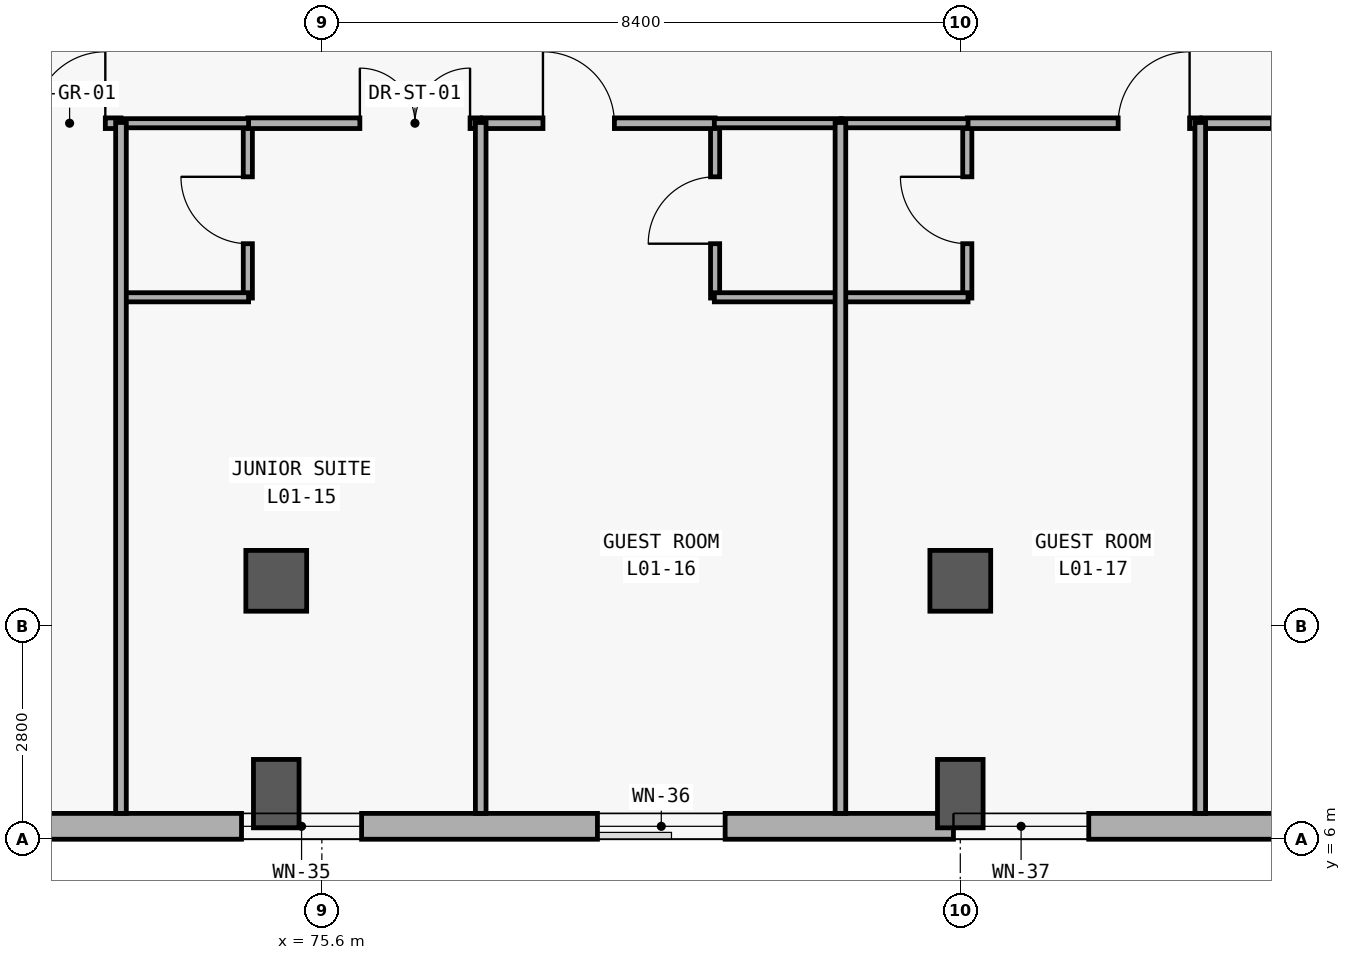
"""IFC4 building model, lengths in metres.
Left out: names, types, materials, properties, quantities, classifications, styles, units other than length and angle.
Written with IfcOpenShell. Run it as: python <this file> out.ifc"""

import sys

from ifc_helpers import new_model, si_unit, direction, frame, frame_2d, origin, origin_2d, place, context, subcontext, project, spatial, rectangle, extrude, element, fill, save


model = new_model("IFC4")
c1 = context("Model", 3, precision=1e-05, world=origin(), true_north=direction((0.0, 1.0)))
c2 = subcontext(c1, "Body", "Model", "MODEL_VIEW")
j1 = project(units=[si_unit("LENGTHUNIT", "METRE"), si_unit("PLANEANGLEUNIT", "RADIAN")], contexts=[c1])
p1 = place(None, origin())
s1 = spatial("IfcSite", under=j1, at=p1, CompositionType="ELEMENT")
p2 = place(p1, origin())
s2 = spatial("IfcBuilding", under=s1, at=p2, CompositionType="ELEMENT")
p3 = place(p2, frame((0.0, 0.0, 5.4)))
s3 = spatial("IfcBuildingStorey", under=s2, at=p3, CompositionType="ELEMENT", Elevation=5.4)
p4 = place(p3, frame((75.0, 6.6, 0.0), z_axis=(0.0, 0.0, 1.0), x_axis=(0.0, 1.0, 0.0)))
e1 = element("IfcColumn", 1, at=p4, inside=s3, PredefinedType="COLUMN", context=c2, shape_type="SweptSolid", body=[
    extrude(rectangle(XDim=0.6, YDim=0.9, at=origin_2d()), origin(), (0.0, 0.0, 1.0), 5.4),
])
p5 = place(p3, frame((75.0, 9.4, 0.0), z_axis=(0.0, 0.0, 1.0), x_axis=(1.0, 0.0, 0.0)))
e2 = element("IfcColumn", 2, at=p5, inside=s3, PredefinedType="COLUMN", context=c2, shape_type="SweptSolid", body=[
    extrude(rectangle(XDim=0.8, YDim=0.8, at=origin_2d()), origin(), (0.0, 0.0, 1.0), 5.4),
])
p6 = place(p3, frame((84.0, 6.6, 0.0), z_axis=(0.0, 0.0, 1.0), x_axis=(0.0, 1.0, 0.0)))
e3 = element("IfcColumn", 3, at=p6, inside=s3, PredefinedType="COLUMN", context=c2, shape_type="SweptSolid", body=[
    extrude(rectangle(XDim=0.6, YDim=0.9, at=origin_2d()), origin(), (0.0, 0.0, 1.0), 5.4),
])
p7 = place(p3, frame((84.0, 9.4, 0.0), z_axis=(0.0, 0.0, 1.0), x_axis=(1.0, 0.0, 0.0)))
e4 = element("IfcColumn", 4, at=p7, inside=s3, PredefinedType="COLUMN", context=c2, shape_type="SweptSolid", body=[
    extrude(rectangle(XDim=0.8, YDim=0.8, at=origin_2d()), origin(), (0.0, 0.0, 1.0), 5.4),
])
p8 = place(p3, frame((92.06, 6.17, 0.0), z_axis=(0.0, 0.0, 1.0), x_axis=(-1.0, 0.0, 0.0)))
e5 = element("IfcWall", 5, at=p8, inside=s3, PredefinedType="SOLIDWALL", context=c2, shape_type="SweptSolid", body=[
    extrude(rectangle(XDim=83.32, YDim=0.34, at=frame_2d((41.66, 0.0))), origin(), (0.0, 0.0, 1.0), 5.1),
])
p9 = place(p8, frame((80.804, 0.0, 0.85)))
e6 = element("IfcOpeningElement", 6, at=p9, cuts=e5, PredefinedType="OPENING", context=c2, shape_type="SweptSolid", body=[
    extrude(rectangle(XDim=1.8, YDim=1.8, at=frame_2d((0.9, 0.9))), frame((0.0, 0.18, 0.0), z_axis=(0.0, -1.0, 0.0), x_axis=(1.0, 0.0, 0.0)), (0.0, 0.0, 1.0), 0.36),
])
p10 = place(p8, frame((78.043, 0.0, 0.85)))
e7 = element("IfcOpeningElement", 7, at=p10, cuts=e5, PredefinedType="OPENING", context=c2, shape_type="SweptSolid", body=[
    extrude(rectangle(XDim=1.5, YDim=1.75, at=frame_2d((0.75, 0.875))), frame((0.0, 0.18, 0.0), z_axis=(0.0, -1.0, 0.0), x_axis=(1.0, 0.0, 0.0)), (0.0, 0.0, 1.0), 0.36),
])
p11 = place(p8, frame((75.057, 0.0, 0.85)))
e8 = element("IfcOpeningElement", 8, at=p11, cuts=e5, PredefinedType="OPENING", context=c2, shape_type="SweptSolid", body=[
    extrude(rectangle(XDim=1.65, YDim=1.75, at=frame_2d((0.825, 0.875))), frame((0.0, 0.18, 0.0), z_axis=(0.0, -1.0, 0.0), x_axis=(1.0, 0.0, 0.0)), (0.0, 0.0, 1.0), 0.36),
])
p12 = place(p8, frame((71.997, 0.0, 0.85)))
e9 = element("IfcOpeningElement", 9, at=p12, cuts=e5, PredefinedType="OPENING", context=c2, shape_type="SweptSolid", body=[
    extrude(rectangle(XDim=1.95, YDim=1.75, at=frame_2d((0.975, 0.875))), frame((0.0, 0.18, 0.0), z_axis=(0.0, -1.0, 0.0), x_axis=(1.0, 0.0, 0.0)), (0.0, 0.0, 1.0), 0.36),
])
p13 = place(p8, frame((69.36, 0.0, 0.85)))
e10 = element("IfcOpeningElement", 10, at=p13, cuts=e5, PredefinedType="OPENING", context=c2, shape_type="SweptSolid", body=[
    extrude(rectangle(XDim=1.4, YDim=1.6, at=frame_2d((0.7, 0.8))), frame((0.0, 0.18, 0.0), z_axis=(0.0, -1.0, 0.0), x_axis=(1.0, 0.0, 0.0)), (0.0, 0.0, 1.0), 0.36),
])
p14 = place(p8, frame((66.349, 0.0, 0.85)))
e11 = element("IfcOpeningElement", 11, at=p14, cuts=e5, PredefinedType="OPENING", context=c2, shape_type="SweptSolid", body=[
    extrude(rectangle(XDim=1.6, YDim=1.6, at=frame_2d((0.8, 0.8))), frame((0.0, 0.18, 0.0), z_axis=(0.0, -1.0, 0.0), x_axis=(1.0, 0.0, 0.0)), (0.0, 0.0, 1.0), 0.36),
])
p15 = place(p8, frame((63.338, 0.0, 0.85)))
e12 = element("IfcOpeningElement", 12, at=p15, cuts=e5, PredefinedType="OPENING", context=c2, shape_type="SweptSolid", body=[
    extrude(rectangle(XDim=1.8, YDim=1.6, at=frame_2d((0.9, 0.8))), frame((0.0, 0.18, 0.0), z_axis=(0.0, -1.0, 0.0), x_axis=(1.0, 0.0, 0.0)), (0.0, 0.0, 1.0), 0.36),
])
p16 = place(p8, frame((60.327, 0.0, 0.85)))
e13 = element("IfcOpeningElement", 13, at=p16, cuts=e5, PredefinedType="OPENING", context=c2, shape_type="SweptSolid", body=[
    extrude(rectangle(XDim=2.0, YDim=1.65, at=frame_2d((1.0, 0.825))), frame((0.0, 0.18, 0.0), z_axis=(0.0, -1.0, 0.0), x_axis=(1.0, 0.0, 0.0)), (0.0, 0.0, 1.0), 0.36),
])
p17 = place(p8, frame((57.791, 0.0, 0.85)))
e14 = element("IfcOpeningElement", 14, at=p17, cuts=e5, PredefinedType="OPENING", context=c2, shape_type="SweptSolid", body=[
    extrude(rectangle(XDim=1.25, YDim=1.45, at=frame_2d((0.625, 0.725))), frame((0.0, 0.18, 0.0), z_axis=(0.0, -1.0, 0.0), x_axis=(1.0, 0.0, 0.0)), (0.0, 0.0, 1.0), 0.36),
])
p18 = place(p8, frame((38.744, 0.0, 0.85)))
e15 = element("IfcOpeningElement", 15, at=p18, cuts=e5, PredefinedType="OPENING", context=c2, shape_type="SweptSolid", body=[
    extrude(rectangle(XDim=3.3, YDim=2.15, at=frame_2d((1.65, 1.075))), frame((0.0, 0.18, 0.0), z_axis=(0.0, -1.0, 0.0), x_axis=(1.0, 0.0, 0.0)), (0.0, 0.0, 1.0), 0.36),
])
p19 = place(p8, frame((35.07, 0.0, 0.85)))
e16 = element("IfcOpeningElement", 16, at=p19, cuts=e5, PredefinedType="OPENING", context=c2, shape_type="SweptSolid", body=[
    extrude(rectangle(XDim=1.18, YDim=1.5, at=frame_2d((0.59, 0.75))), frame((0.0, 0.18, 0.0), z_axis=(0.0, -1.0, 0.0), x_axis=(1.0, 0.0, 0.0)), (0.0, 0.0, 1.0), 0.36),
])
p20 = place(p8, frame((30.287, 0.0, 0.85)))
e17 = element("IfcOpeningElement", 17, at=p20, cuts=e5, PredefinedType="OPENING", context=c2, shape_type="SweptSolid", body=[
    extrude(rectangle(XDim=1.28, YDim=1.6, at=frame_2d((0.64, 0.8))), frame((0.0, 0.18, 0.0), z_axis=(0.0, -1.0, 0.0), x_axis=(1.0, 0.0, 0.0)), (0.0, 0.0, 1.0), 0.36),
])
p21 = place(p8, frame((25.503, 0.0, 0.85)))
e18 = element("IfcOpeningElement", 18, at=p21, cuts=e5, PredefinedType="OPENING", context=c2, shape_type="SweptSolid", body=[
    extrude(rectangle(XDim=1.38, YDim=1.7, at=frame_2d((0.69, 0.85))), frame((0.0, 0.18, 0.0), z_axis=(0.0, -1.0, 0.0), x_axis=(1.0, 0.0, 0.0)), (0.0, 0.0, 1.0), 0.36),
])
p22 = place(p8, frame((20.72, 0.0, 0.85)))
e19 = element("IfcOpeningElement", 19, at=p22, cuts=e5, PredefinedType="OPENING", context=c2, shape_type="SweptSolid", body=[
    extrude(rectangle(XDim=1.48, YDim=1.8, at=frame_2d((0.74, 0.9))), frame((0.0, 0.18, 0.0), z_axis=(0.0, -1.0, 0.0), x_axis=(1.0, 0.0, 0.0)), (0.0, 0.0, 1.0), 0.36),
])
p23 = place(p8, frame((15.937, 0.0, 0.85)))
e20 = element("IfcOpeningElement", 20, at=p23, cuts=e5, PredefinedType="OPENING", context=c2, shape_type="SweptSolid", body=[
    extrude(rectangle(XDim=1.58, YDim=1.85, at=frame_2d((0.79, 0.925))), frame((0.0, 0.18, 0.0), z_axis=(0.0, -1.0, 0.0), x_axis=(1.0, 0.0, 0.0)), (0.0, 0.0, 1.0), 0.36),
])
p24 = place(p8, frame((11.154, 0.0, 0.85)))
e21 = element("IfcOpeningElement", 21, at=p24, cuts=e5, PredefinedType="OPENING", context=c2, shape_type="SweptSolid", body=[
    extrude(rectangle(XDim=1.68, YDim=1.9, at=frame_2d((0.84, 0.95))), frame((0.0, 0.18, 0.0), z_axis=(0.0, -1.0, 0.0), x_axis=(1.0, 0.0, 0.0)), (0.0, 0.0, 1.0), 0.36),
])
p25 = place(p8, frame((6.37, 0.0, 0.85)))
e22 = element("IfcOpeningElement", 22, at=p25, cuts=e5, PredefinedType="OPENING", context=c2, shape_type="SweptSolid", body=[
    extrude(rectangle(XDim=1.78, YDim=1.95, at=frame_2d((0.89, 0.975))), frame((0.0, 0.18, 0.0), z_axis=(0.0, -1.0, 0.0), x_axis=(1.0, 0.0, 0.0)), (0.0, 0.0, 1.0), 0.36),
])
p26 = place(p8, frame((1.586, 0.0, 0.85)))
e23 = element("IfcOpeningElement", 23, at=p26, cuts=e5, PredefinedType="OPENING", context=c2, shape_type="SweptSolid", body=[
    extrude(rectangle(XDim=1.88, YDim=1.95, at=frame_2d((0.94, 0.975))), frame((0.0, 0.18, 0.0), z_axis=(0.0, -1.0, 0.0), x_axis=(1.0, 0.0, 0.0)), (0.0, 0.0, 1.0), 0.36),
])
p27 = place(p3, frame((74.626, 13.12, 0.0), z_axis=(0.0, 0.0, 1.0), x_axis=(0.0, 1.0, 0.0)))
e24 = element("IfcWall", 24, at=p27, inside=s3, PredefinedType="PARTITIONING", context=c2, shape_type="SweptSolid", body=[
    extrude(rectangle(XDim=2.31, YDim=0.12, at=frame_2d((1.155, 0.0))), origin(), (0.0, 0.0, 1.0), 4.18),
])
p28 = place(p27, frame((0.715, 0.0, 0.0)))
e25 = element("IfcOpeningElement", 25, at=p28, cuts=e24, PredefinedType="OPENING", context=c2, shape_type="SweptSolid", body=[
    extrude(rectangle(XDim=0.88, YDim=2.15, at=frame_2d((0.44, 1.075))), frame((0.0, 0.07, 0.0), z_axis=(0.0, -1.0, 0.0), x_axis=(1.0, 0.0, 0.0)), (0.0, 0.0, 1.0), 0.14),
])
p29 = place(p3, frame((80.774, 13.12, 0.0), z_axis=(0.0, 0.0, 1.0), x_axis=(0.0, 1.0, 0.0)))
e26 = element("IfcWall", 26, at=p29, inside=s3, PredefinedType="PARTITIONING", context=c2, shape_type="SweptSolid", body=[
    extrude(rectangle(XDim=2.31, YDim=0.12, at=frame_2d((1.155, 0.0))), origin(), (0.0, 0.0, 1.0), 4.18),
])
p30 = place(p29, frame((0.715, 0.0, 0.0)))
e27 = element("IfcOpeningElement", 27, at=p30, cuts=e26, PredefinedType="OPENING", context=c2, shape_type="SweptSolid", body=[
    extrude(rectangle(XDim=0.88, YDim=2.15, at=frame_2d((0.44, 1.075))), frame((0.0, 0.07, 0.0), z_axis=(0.0, -1.0, 0.0), x_axis=(1.0, 0.0, 0.0)), (0.0, 0.0, 1.0), 0.14),
])
p31 = place(p3, frame((84.092, 13.12, 0.0), z_axis=(0.0, 0.0, 1.0), x_axis=(0.0, 1.0, 0.0)))
e28 = element("IfcWall", 28, at=p31, inside=s3, PredefinedType="PARTITIONING", context=c2, shape_type="SweptSolid", body=[
    extrude(rectangle(XDim=2.31, YDim=0.12, at=frame_2d((1.155, 0.0))), origin(), (0.0, 0.0, 1.0), 4.18),
])
p32 = place(p31, frame((0.715, 0.0, 0.0)))
e29 = element("IfcOpeningElement", 29, at=p32, cuts=e28, PredefinedType="OPENING", context=c2, shape_type="SweptSolid", body=[
    extrude(rectangle(XDim=0.88, YDim=2.15, at=frame_2d((0.44, 1.075))), frame((0.0, 0.07, 0.0), z_axis=(0.0, -1.0, 0.0), x_axis=(1.0, 0.0, 0.0)), (0.0, 0.0, 1.0), 0.14),
])
p33 = place(p3, frame((69.892, 15.42, 0.0), z_axis=(0.0, 0.0, 1.0), x_axis=(1.0, 0.0, 0.0)))
e30 = element("IfcWall", 30, at=p33, inside=s3, PredefinedType="PARTITIONING", context=c2, shape_type="SweptSolid", body=[
    extrude(rectangle(XDim=3.065, YDim=0.14, at=frame_2d((1.532, 0.0))), origin(), (0.0, 0.0, 1.0), 4.18),
])
p34 = place(p33, frame((1.919, 0.0, 0.0)))
e31 = element("IfcOpeningElement", 31, at=p34, cuts=e30, PredefinedType="OPENING", context=c2, shape_type="SweptSolid", body=[
    extrude(rectangle(XDim=0.94, YDim=2.2, at=frame_2d((0.47, 1.1))), frame((0.0, 0.08, 0.0), z_axis=(0.0, -1.0, 0.0), x_axis=(1.0, 0.0, 0.0)), (0.0, 0.0, 1.0), 0.16),
])
p35 = place(p3, frame((74.626, 15.42, 0.0), z_axis=(0.0, 0.0, 1.0), x_axis=(1.0, 0.0, 0.0)))
e32 = element("IfcWall", 32, at=p35, inside=s3, PredefinedType="PARTITIONING", context=c2, shape_type="SweptSolid", body=[
    extrude(rectangle(XDim=3.064, YDim=0.14, at=frame_2d((1.532, 0.0))), origin(), (0.0, 0.0, 1.0), 4.18),
])
p36 = place(p35, frame((1.474, 0.0, 0.0)))
e33 = element("IfcOpeningElement", 33, at=p36, cuts=e32, PredefinedType="OPENING", context=c2, shape_type="SweptSolid", body=[
    extrude(rectangle(XDim=1.45, YDim=2.3, at=frame_2d((0.725, 1.15))), frame((0.0, 0.08, 0.0), z_axis=(0.0, -1.0, 0.0), x_axis=(1.0, 0.0, 0.0)), (0.0, 0.0, 1.0), 0.16),
])
p37 = place(p3, frame((77.71, 15.42, 0.0), z_axis=(0.0, 0.0, 1.0), x_axis=(1.0, 0.0, 0.0)))
e34 = element("IfcWall", 34, at=p37, inside=s3, PredefinedType="PARTITIONING", context=c2, shape_type="SweptSolid", body=[
    extrude(rectangle(XDim=3.064, YDim=0.14, at=frame_2d((1.532, 0.0))), origin(), (0.0, 0.0, 1.0), 4.18),
])
p38 = place(p37, frame((0.799, 0.0, 0.0)))
e35 = element("IfcOpeningElement", 35, at=p38, cuts=e34, PredefinedType="OPENING", context=c2, shape_type="SweptSolid", body=[
    extrude(rectangle(XDim=0.94, YDim=2.2, at=frame_2d((0.47, 1.1))), frame((0.0, 0.08, 0.0), z_axis=(0.0, -1.0, 0.0), x_axis=(1.0, 0.0, 0.0)), (0.0, 0.0, 1.0), 0.16),
])
p39 = place(p3, frame((84.092, 15.42, 0.0), z_axis=(0.0, 0.0, 1.0), x_axis=(1.0, 0.0, 0.0)))
e36 = element("IfcWall", 36, at=p39, inside=s3, PredefinedType="PARTITIONING", context=c2, shape_type="SweptSolid", body=[
    extrude(rectangle(XDim=3.065, YDim=0.14, at=frame_2d((1.532, 0.0))), origin(), (0.0, 0.0, 1.0), 4.18),
])
p40 = place(p39, frame((1.985, 0.0, 0.0)))
e37 = element("IfcOpeningElement", 37, at=p40, cuts=e36, PredefinedType="OPENING", context=c2, shape_type="SweptSolid", body=[
    extrude(rectangle(XDim=0.94, YDim=2.2, at=frame_2d((0.47, 1.1))), frame((0.0, 0.08, 0.0), z_axis=(0.0, -1.0, 0.0), x_axis=(1.0, 0.0, 0.0)), (0.0, 0.0, 1.0), 0.16),
])
p41 = place(p3, frame((87.177, 15.42, 0.0), z_axis=(0.0, 0.0, 1.0), x_axis=(1.0, 0.0, 0.0)))
e38 = element("IfcWall", 38, at=p41, inside=s3, PredefinedType="PARTITIONING", context=c2, shape_type="SweptSolid", body=[
    extrude(rectangle(XDim=3.064, YDim=0.14, at=frame_2d((1.532, 0.0))), origin(), (0.0, 0.0, 1.0), 4.18),
])
p42 = place(p41, frame((0.93, 0.0, 0.0)))
e39 = element("IfcOpeningElement", 39, at=p42, cuts=e38, PredefinedType="OPENING", context=c2, shape_type="SweptSolid", body=[
    extrude(rectangle(XDim=0.94, YDim=2.2, at=frame_2d((0.47, 1.1))), frame((0.0, 0.08, 0.0), z_axis=(0.0, -1.0, 0.0), x_axis=(1.0, 0.0, 0.0)), (0.0, 0.0, 1.0), 0.16),
])
for number, where, z_axis, x_axis in (
    (40, (72.967, 13.13, 0.0), (0.0, 0.0, 1.0), (1.0, 0.0, 0.0)),
    (41, (72.967, 15.42, 0.0), (0.0, 0.0, 1.0), (1.0, 0.0, 0.0)),
):
    element("IfcWall", number, at=place(p3, frame(where, z_axis=z_axis, x_axis=x_axis)), inside=s3, PredefinedType="PARTITIONING", context=c2, shape_type="SweptSolid", body=[
        extrude(rectangle(XDim=1.669, YDim=0.12, at=frame_2d((0.834, 0.0))), origin(), (0.0, 0.0, 1.0), 4.18),
    ])
for number, where, z_axis, x_axis in (
    (42, (80.764, 13.13, 0.0), (0.0, 0.0, 1.0), (1.0, 0.0, 0.0)),
    (43, (80.764, 15.42, 0.0), (0.0, 0.0, 1.0), (1.0, 0.0, 0.0)),
):
    element("IfcWall", number, at=place(p3, frame(where, z_axis=z_axis, x_axis=x_axis)), inside=s3, PredefinedType="PARTITIONING", context=c2, shape_type="SweptSolid", body=[
        extrude(rectangle(XDim=1.669, YDim=0.12, at=frame_2d((0.834, 0.0))), origin(), (0.0, 0.0, 1.0), 4.18),
    ])
for number, where, z_axis, x_axis in (
    (44, (82.433, 13.13, 0.0), (0.0, 0.0, 1.0), (1.0, 0.0, 0.0)),
    (45, (82.433, 15.42, 0.0), (0.0, 0.0, 1.0), (1.0, 0.0, 0.0)),
):
    element("IfcWall", number, at=place(p3, frame(where, z_axis=z_axis, x_axis=x_axis)), inside=s3, PredefinedType="PARTITIONING", context=c2, shape_type="SweptSolid", body=[
        extrude(rectangle(XDim=1.669, YDim=0.12, at=frame_2d((0.834, 0.0))), origin(), (0.0, 0.0, 1.0), 4.18),
    ])
for number, where, z_axis, x_axis in (
    (46, (72.957, 6.34, 0.0), (0.0, 0.0, 1.0), (0.0, 1.0, 0.0)),
    (47, (77.69, 6.34, 0.0), (0.0, 0.0, 1.0), (0.0, 1.0, 0.0)),
    (48, (82.423, 6.34, 0.0), (0.0, 0.0, 1.0), (0.0, 1.0, 0.0)),
    (49, (87.157, 6.34, 0.0), (0.0, 0.0, 1.0), (0.0, 1.0, 0.0)),
):
    element("IfcWall", number, at=place(p3, frame(where, z_axis=z_axis, x_axis=x_axis)), inside=s3, PredefinedType="PARTITIONING", context=c2, shape_type="SweptSolid", body=[
        extrude(rectangle(XDim=9.09, YDim=0.14, at=frame_2d((4.545, 0.0))), origin(), (0.0, 0.0, 1.0), 4.18),
    ])
p43 = place(p23, origin())
e50 = element("IfcWindow", 50, at=p43, inside=s3, PartitioningType="SINGLE_PANEL", PredefinedType="WINDOW", context=c2, shape_type="SweptSolid", body=[
    extrude(rectangle(XDim=1.58, YDim=1.85, at=frame_2d((0.79, 0.925))), frame((0.0, 0.03, 0.0), z_axis=(0.0, -1.0, 0.0), x_axis=(1.0, 0.0, 0.0)), (0.0, 0.0, 1.0), 0.06),
])
fill(e20, e50)
p44 = place(p24, origin())
e51 = element("IfcWindow", 51, at=p44, inside=s3, PartitioningType="SINGLE_PANEL", PredefinedType="WINDOW", context=c2, shape_type="SweptSolid", body=[
    extrude(rectangle(XDim=1.68, YDim=1.9, at=frame_2d((0.84, 0.95))), frame((0.0, 0.03, 0.0), z_axis=(0.0, -1.0, 0.0), x_axis=(1.0, 0.0, 0.0)), (0.0, 0.0, 1.0), 0.06),
])
fill(e21, e51)
p45 = place(p25, origin())
e52 = element("IfcWindow", 52, at=p45, inside=s3, PartitioningType="SINGLE_PANEL", PredefinedType="WINDOW", context=c2, shape_type="SweptSolid", body=[
    extrude(rectangle(XDim=1.78, YDim=1.95, at=frame_2d((0.89, 0.975))), frame((0.0, 0.03, 0.0), z_axis=(0.0, -1.0, 0.0), x_axis=(1.0, 0.0, 0.0)), (0.0, 0.0, 1.0), 0.06),
])
fill(e22, e52)
p46 = place(p28, origin())
e53 = element("IfcDoor", 53, at=p46, inside=s3, OperationType="SINGLE_SWING_RIGHT", PredefinedType="DOOR", context=c2, shape_type="SweptSolid", body=[
    extrude(rectangle(XDim=0.88, YDim=2.15, at=frame_2d((0.44, 1.075))), frame((0.0, 0.025, 0.0), z_axis=(0.0, -1.0, 0.0), x_axis=(1.0, 0.0, 0.0)), (0.0, 0.0, 1.0), 0.05),
])
fill(e25, e53)
p47 = place(p30, origin())
e54 = element("IfcDoor", 54, at=p47, inside=s3, OperationType="SINGLE_SWING_LEFT", PredefinedType="DOOR", context=c2, shape_type="SweptSolid", body=[
    extrude(rectangle(XDim=0.88, YDim=2.15, at=frame_2d((0.44, 1.075))), frame((0.0, 0.025, 0.0), z_axis=(0.0, -1.0, 0.0), x_axis=(1.0, 0.0, 0.0)), (0.0, 0.0, 1.0), 0.05),
])
fill(e27, e54)
p48 = place(p32, origin())
e55 = element("IfcDoor", 55, at=p48, inside=s3, OperationType="SINGLE_SWING_RIGHT", PredefinedType="DOOR", context=c2, shape_type="SweptSolid", body=[
    extrude(rectangle(XDim=0.88, YDim=2.15, at=frame_2d((0.44, 1.075))), frame((0.0, 0.025, 0.0), z_axis=(0.0, -1.0, 0.0), x_axis=(1.0, 0.0, 0.0)), (0.0, 0.0, 1.0), 0.05),
])
fill(e29, e55)
p49 = place(p34, origin())
e56 = element("IfcDoor", 56, at=p49, inside=s3, OperationType="SINGLE_SWING_RIGHT", PredefinedType="DOOR", context=c2, shape_type="SweptSolid", body=[
    extrude(rectangle(XDim=0.94, YDim=2.2, at=frame_2d((0.47, 1.1))), frame((0.0, 0.025, 0.0), z_axis=(0.0, -1.0, 0.0), x_axis=(1.0, 0.0, 0.0)), (0.0, 0.0, 1.0), 0.05),
])
fill(e31, e56)
p50 = place(p36, origin())
e57 = element("IfcDoor", 57, at=p50, inside=s3, OperationType="DOUBLE_DOOR_SINGLE_SWING", PredefinedType="DOOR", context=c2, shape_type="SweptSolid", body=[
    extrude(rectangle(XDim=1.45, YDim=2.3, at=frame_2d((0.725, 1.15))), frame((0.0, 0.025, 0.0), z_axis=(0.0, -1.0, 0.0), x_axis=(1.0, 0.0, 0.0)), (0.0, 0.0, 1.0), 0.05),
])
fill(e33, e57)
p51 = place(p38, origin())
e58 = element("IfcDoor", 58, at=p51, inside=s3, OperationType="SINGLE_SWING_LEFT", PredefinedType="DOOR", context=c2, shape_type="SweptSolid", body=[
    extrude(rectangle(XDim=0.94, YDim=2.2, at=frame_2d((0.47, 1.1))), frame((0.0, 0.025, 0.0), z_axis=(0.0, -1.0, 0.0), x_axis=(1.0, 0.0, 0.0)), (0.0, 0.0, 1.0), 0.05),
])
fill(e35, e58)
p52 = place(p40, origin())
e59 = element("IfcDoor", 59, at=p52, inside=s3, OperationType="SINGLE_SWING_RIGHT", PredefinedType="DOOR", context=c2, shape_type="SweptSolid", body=[
    extrude(rectangle(XDim=0.94, YDim=2.2, at=frame_2d((0.47, 1.1))), frame((0.0, 0.025, 0.0), z_axis=(0.0, -1.0, 0.0), x_axis=(1.0, 0.0, 0.0)), (0.0, 0.0, 1.0), 0.05),
])
fill(e37, e59)
save(model, sys.argv[1])
